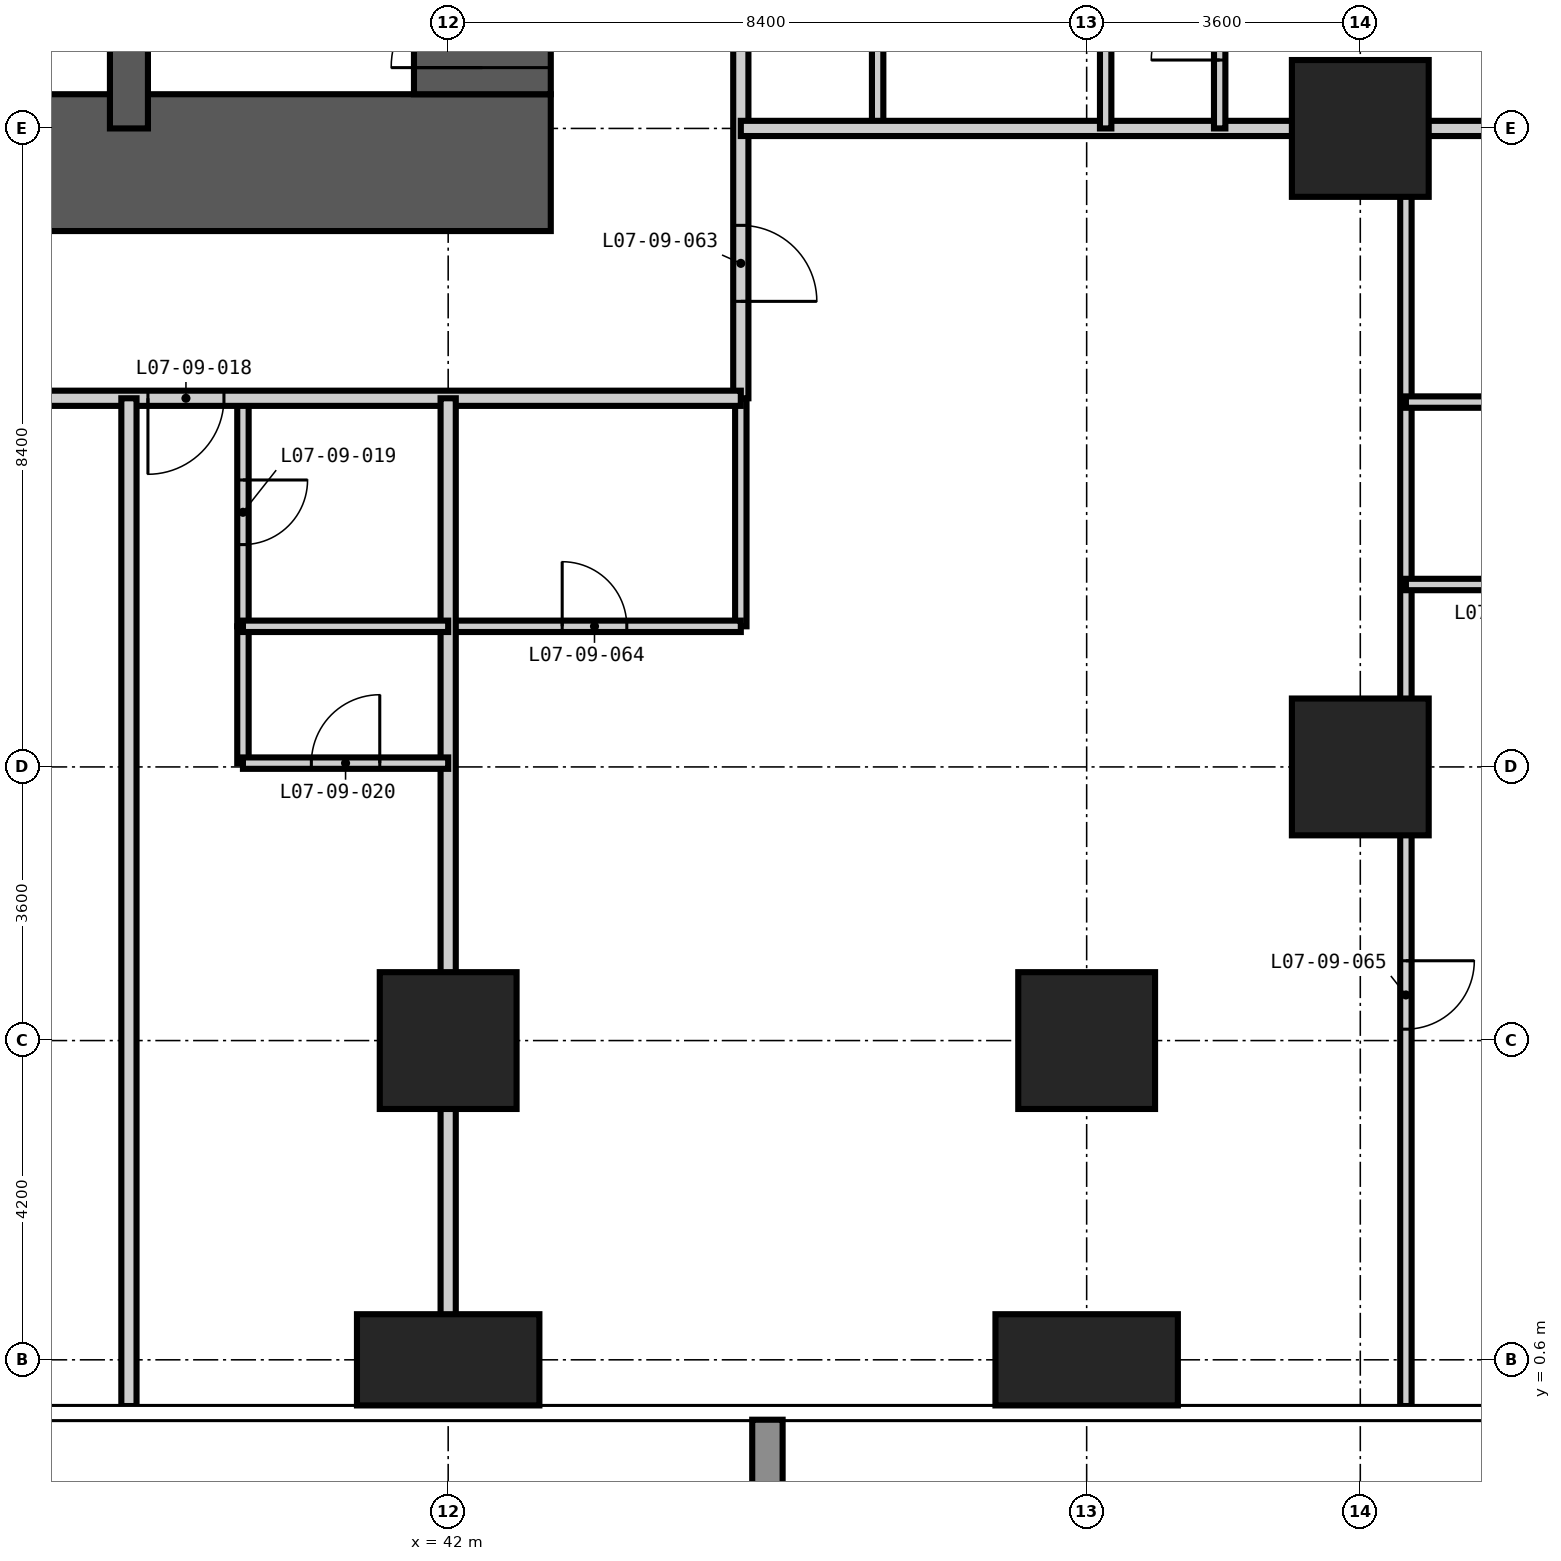
"""IFC4 building model, lengths in metres.
Left out: names, types, materials, properties, quantities, classifications, styles, units other than length and angle.
Written with IfcOpenShell. Run it as: python <this file> out.ifc"""

import sys

from ifc_helpers import new_model, si_unit, direction, frame, frame_2d, origin, origin_2d, place, context, subcontext, project, spatial, rectangle, extrude, element, fill, save


model = new_model("IFC4")
c1 = context("Model", 3, precision=1e-05, world=origin(), true_north=direction((0.0, 1.0)))
c2 = subcontext(c1, "Body", "Model", "MODEL_VIEW")
j1 = project(units=[si_unit("LENGTHUNIT", "METRE"), si_unit("PLANEANGLEUNIT", "RADIAN")], contexts=[c1])
p1 = place(None, origin())
s1 = spatial("IfcSite", under=j1, at=p1, CompositionType="ELEMENT")
p2 = place(p1, origin())
s2 = spatial("IfcBuilding", under=s1, at=p2, CompositionType="ELEMENT")
p3 = place(p2, frame((0.0, 0.0, 34.2)))
s3 = spatial("IfcBuildingStorey", under=s2, at=p3, CompositionType="ELEMENT", Elevation=34.2)
p4 = place(p3, frame((42.0, 0.6, -0.35), z_axis=(0.0, 0.0, 1.0), x_axis=(1.0, 0.0, 0.0)))
e1 = element("IfcColumn", 1, at=p4, inside=s3, PredefinedType="COLUMN", context=c2, shape_type="SweptSolid", body=[
    extrude(rectangle(XDim=2.4, YDim=1.2, at=origin_2d()), origin(), (0.0, 0.0, 1.0), 3.6),
])
p5 = place(p3, frame((42.0, 4.8, -0.35), z_axis=(0.0, 0.0, 1.0), x_axis=(1.0, 0.0, 0.0)))
e2 = element("IfcColumn", 2, at=p5, inside=s3, PredefinedType="COLUMN", context=c2, shape_type="SweptSolid", body=[
    extrude(rectangle(XDim=1.8, YDim=1.8, at=origin_2d()), origin(), (0.0, 0.0, 1.0), 3.6),
])
p6 = place(p3, frame((50.4, 0.6, -0.35), z_axis=(0.0, 0.0, 1.0), x_axis=(1.0, 0.0, 0.0)))
e3 = element("IfcColumn", 3, at=p6, inside=s3, PredefinedType="COLUMN", context=c2, shape_type="SweptSolid", body=[
    extrude(rectangle(XDim=2.4, YDim=1.2, at=origin_2d()), origin(), (0.0, 0.0, 1.0), 3.6),
])
for number, where, z_axis, x_axis in (
    (4, (50.4, 4.8, -0.35), (0.0, 0.0, 1.0), (1.0, 0.0, 0.0)),
    (5, (54.0, 8.4, -0.35), (0.0, 0.0, 1.0), (1.0, 0.0, 0.0)),
    (6, (54.0, 16.8, -0.35), (0.0, 0.0, 1.0), (1.0, 0.0, 0.0)),
):
    element("IfcColumn", number, at=place(p3, frame(where, z_axis=z_axis, x_axis=x_axis)), inside=s3, PredefinedType="COLUMN", context=c2, shape_type="SweptSolid", body=[
        extrude(rectangle(XDim=1.8, YDim=1.8, at=origin_2d()), origin(), (0.0, 0.0, 1.0), 3.6),
    ])
p7 = place(p3, frame((15.45, 16.35, -0.35), z_axis=(0.0, 0.0, 1.0), x_axis=(1.0, 0.0, 0.0)))
e7 = element("IfcWall", 7, at=p7, inside=s3, PredefinedType="SHEAR", context=c2, shape_type="SweptSolid", body=[
    extrude(rectangle(XDim=27.9, YDim=1.8, at=frame_2d((13.95, 0.0))), origin(), (0.0, 0.0, 1.0), 3.6),
])
p8 = place(p7, frame((13.45, 0.0, 0.35)))
e8 = element("IfcOpeningElement", 8, at=p8, cuts=e7, PredefinedType="OPENING", context=c2, shape_type="SweptSolid", body=[
    extrude(rectangle(XDim=1.0, YDim=2.1, at=frame_2d((0.5, 1.05))), frame((0.0, 0.91, 0.0), z_axis=(0.0, -1.0, 0.0), x_axis=(1.0, 0.0, 0.0)), (0.0, 0.0, 1.0), 1.82),
])
p9 = place(p7, frame((19.75, 0.0, 0.35)))
e9 = element("IfcOpeningElement", 9, at=p9, cuts=e7, PredefinedType="OPENING", context=c2, shape_type="SweptSolid", body=[
    extrude(rectangle(XDim=1.0, YDim=2.1, at=frame_2d((0.5, 1.05))), frame((0.0, 0.91, 0.0), z_axis=(0.0, -1.0, 0.0), x_axis=(1.0, 0.0, 0.0)), (0.0, 0.0, 1.0), 1.82),
])
p10 = place(p3, frame((42.45, 17.25, -0.35), z_axis=(0.0, 0.0, 1.0), x_axis=(0.0, 1.0, 0.0)))
e10 = element("IfcWall", 10, at=p10, inside=s3, PredefinedType="SHEAR", context=c2, shape_type="SweptSolid", body=[
    extrude(rectangle(XDim=24.3, YDim=1.8, at=frame_2d((12.15, 0.0))), origin(), (0.0, 0.0, 1.0), 3.6),
])
p11 = place(p10, frame((0.35, 0.0, 0.35)))
e11 = element("IfcOpeningElement", 11, at=p11, cuts=e10, PredefinedType="OPENING", context=c2, shape_type="SweptSolid", body=[
    extrude(rectangle(XDim=1.2, YDim=2.2, at=frame_2d((0.6, 1.1))), frame((0.0, 0.91, 0.0), z_axis=(0.0, -1.0, 0.0), x_axis=(1.0, 0.0, 0.0)), (0.0, 0.0, 1.0), 1.82),
])
p12 = place(p10, frame((11.65, 0.0, 0.35)))
e12 = element("IfcOpeningElement", 12, at=p12, cuts=e10, PredefinedType="OPENING", context=c2, shape_type="SweptSolid", body=[
    extrude(rectangle(XDim=1.0, YDim=2.1, at=frame_2d((0.5, 1.05))), frame((0.0, 0.91, 0.0), z_axis=(0.0, -1.0, 0.0), x_axis=(1.0, 0.0, 0.0)), (0.0, 0.0, 1.0), 1.82),
])
p13 = place(p10, frame((20.05, 0.0, 0.35)))
e13 = element("IfcOpeningElement", 13, at=p13, cuts=e10, PredefinedType="OPENING", context=c2, shape_type="SweptSolid", body=[
    extrude(rectangle(XDim=1.0, YDim=2.1, at=frame_2d((0.5, 1.05))), frame((0.0, 0.91, 0.0), z_axis=(0.0, -1.0, 0.0), x_axis=(1.0, 0.0, 0.0)), (0.0, 0.0, 1.0), 1.82),
])
p14 = place(p3, frame((37.8, 16.8, -0.35), z_axis=(0.0, 0.0, 1.0), x_axis=(0.0, 1.0, 0.0)))
e14 = element("IfcWall", 14, at=p14, inside=s3, PredefinedType="SHEAR", context=c2, shape_type="SweptSolid", body=[
    extrude(rectangle(XDim=11.2, YDim=0.5, at=frame_2d((5.6, 0.0))), origin(), (0.0, 0.0, 1.0), 3.6),
])
p15 = place(p3, frame((39.3, 10.25, 0.0), z_axis=(0.0, 0.0, 1.0), x_axis=(0.0, 1.0, 0.0)))
e15 = element("IfcWall", 15, at=p15, inside=s3, PredefinedType="PARTITIONING", context=c2, shape_type="SweptSolid", body=[
    extrude(rectangle(XDim=3.0, YDim=0.15, at=frame_2d((1.5, 0.0))), origin(), (0.0, 0.0, 1.0), 3.25),
])
p16 = place(p15, frame((1.075, 0.0, 0.0)))
e16 = element("IfcOpeningElement", 16, at=p16, cuts=e15, PredefinedType="OPENING", context=c2, shape_type="SweptSolid", body=[
    extrude(rectangle(XDim=0.85, YDim=2.1, at=frame_2d((0.425, 1.05))), frame((0.0, 0.085, 0.0), z_axis=(0.0, -1.0, 0.0), x_axis=(1.0, 0.0, 0.0)), (0.0, 0.0, 1.0), 0.17),
])
p17 = place(p3, frame((45.85, 10.25, 0.0), z_axis=(0.0, 0.0, 1.0), x_axis=(0.0, 1.0, 0.0)))
e17 = element("IfcWall", 17, at=p17, inside=s3, PredefinedType="PARTITIONING", context=c2, shape_type="SweptSolid", body=[
    extrude(rectangle(XDim=3.0, YDim=0.15, at=frame_2d((1.5, 0.0))), origin(), (0.0, 0.0, 1.0), 3.25),
])
p18 = place(p3, frame((47.65, 16.8, 0.0), z_axis=(0.0, 0.0, 1.0), x_axis=(0.0, 1.0, 0.0)))
e18 = element("IfcWall", 18, at=p18, inside=s3, PredefinedType="PARTITIONING", context=c2, shape_type="SweptSolid", body=[
    extrude(rectangle(XDim=2.7, YDim=0.15, at=frame_2d((1.35, 0.0))), origin(), (0.0, 0.0, 1.0), 3.25),
])
p19 = place(p3, frame((42.0, 10.25, 0.0), z_axis=(0.0, 0.0, 1.0), x_axis=(1.0, 0.0, 0.0)))
e19 = element("IfcWall", 19, at=p19, inside=s3, PredefinedType="PARTITIONING", context=c2, shape_type="SweptSolid", body=[
    extrude(rectangle(XDim=3.85, YDim=0.15, at=frame_2d((1.925, 0.0))), origin(), (0.0, 0.0, 1.0), 3.25),
])
p20 = place(p19, frame((1.5, 0.0, 0.0)))
e20 = element("IfcOpeningElement", 20, at=p20, cuts=e19, PredefinedType="OPENING", context=c2, shape_type="SweptSolid", body=[
    extrude(rectangle(XDim=0.85, YDim=2.1, at=frame_2d((0.425, 1.05))), frame((0.0, 0.085, 0.0), z_axis=(0.0, -1.0, 0.0), x_axis=(1.0, 0.0, 0.0)), (0.0, 0.0, 1.0), 0.17),
])
p21 = place(p3, frame((45.85, 45.25, 0.0), z_axis=(0.0, 0.0, 1.0), x_axis=(0.0, -1.0, 0.0)))
e21 = element("IfcWall", 21, at=p21, inside=s3, PredefinedType="PARTITIONING", context=c2, shape_type="SweptSolid", body=[
    extrude(rectangle(XDim=32.0, YDim=0.2, at=frame_2d((16.0, 0.0))), origin(), (0.0, 0.0, 1.0), 3.25),
])
p22 = place(p21, frame((23.75, 0.0, 0.0)))
e22 = element("IfcOpeningElement", 22, at=p22, cuts=e21, PredefinedType="OPENING", context=c2, shape_type="SweptSolid", body=[
    extrude(rectangle(XDim=1.0, YDim=2.2, at=frame_2d((0.5, 1.1))), frame((0.0, 0.11, 0.0), z_axis=(0.0, -1.0, 0.0), x_axis=(1.0, 0.0, 0.0)), (0.0, 0.0, 1.0), 0.22),
])
p23 = place(p21, frame((15.35, 0.0, 0.0)))
e23 = element("IfcOpeningElement", 23, at=p23, cuts=e21, PredefinedType="OPENING", context=c2, shape_type="SweptSolid", body=[
    extrude(rectangle(XDim=1.0, YDim=2.2, at=frame_2d((0.5, 1.1))), frame((0.0, 0.11, 0.0), z_axis=(0.0, -1.0, 0.0), x_axis=(1.0, 0.0, 0.0)), (0.0, 0.0, 1.0), 0.22),
])
p24 = place(p21, frame((6.95, 0.0, 0.0)))
e24 = element("IfcOpeningElement", 24, at=p24, cuts=e21, PredefinedType="OPENING", context=c2, shape_type="SweptSolid", body=[
    extrude(rectangle(XDim=1.0, YDim=2.2, at=frame_2d((0.5, 1.1))), frame((0.0, 0.11, 0.0), z_axis=(0.0, -1.0, 0.0), x_axis=(1.0, 0.0, 0.0)), (0.0, 0.0, 1.0), 0.22),
])
p25 = place(p21, frame((29.725, 0.0, 0.0)))
e25 = element("IfcOpeningElement", 25, at=p25, cuts=e21, PredefinedType="OPENING", context=c2, shape_type="SweptSolid", body=[
    extrude(rectangle(XDim=1.0, YDim=2.2, at=frame_2d((0.5, 1.1))), frame((0.0, 0.11, 0.0), z_axis=(0.0, -1.0, 0.0), x_axis=(1.0, 0.0, 0.0)), (0.0, 0.0, 1.0), 0.22),
])
p26 = place(p21, frame((1.125, 0.0, 0.0)))
e26 = element("IfcOpeningElement", 26, at=p26, cuts=e21, PredefinedType="OPENING", context=c2, shape_type="SweptSolid", body=[
    extrude(rectangle(XDim=1.0, YDim=2.2, at=frame_2d((0.5, 1.1))), frame((0.0, 0.11, 0.0), z_axis=(0.0, -1.0, 0.0), x_axis=(1.0, 0.0, 0.0)), (0.0, 0.0, 1.0), 0.22),
])
p27 = place(p3, frame((45.85, 13.25, 0.0), z_axis=(0.0, 0.0, 1.0), x_axis=(-1.0, 0.0, 0.0)))
e27 = element("IfcWall", 27, at=p27, inside=s3, PredefinedType="PARTITIONING", context=c2, shape_type="SweptSolid", body=[
    extrude(rectangle(XDim=32.6, YDim=0.2, at=frame_2d((16.3, 0.0))), origin(), (0.0, 0.0, 1.0), 3.25),
])
p28 = place(p27, frame((25.1, 0.0, 0.0)))
e28 = element("IfcOpeningElement", 28, at=p28, cuts=e27, PredefinedType="OPENING", context=c2, shape_type="SweptSolid", body=[
    extrude(rectangle(XDim=1.0, YDim=2.2, at=frame_2d((0.5, 1.1))), frame((0.0, 0.11, 0.0), z_axis=(0.0, -1.0, 0.0), x_axis=(1.0, 0.0, 0.0)), (0.0, 0.0, 1.0), 0.22),
])
p29 = place(p27, frame((21.65, 0.0, 0.0)))
e29 = element("IfcOpeningElement", 29, at=p29, cuts=e27, PredefinedType="OPENING", context=c2, shape_type="SweptSolid", body=[
    extrude(rectangle(XDim=1.0, YDim=2.2, at=frame_2d((0.5, 1.1))), frame((0.0, 0.11, 0.0), z_axis=(0.0, -1.0, 0.0), x_axis=(1.0, 0.0, 0.0)), (0.0, 0.0, 1.0), 0.22),
])
p30 = place(p27, frame((11.75, 0.0, 0.0)))
e30 = element("IfcOpeningElement", 30, at=p30, cuts=e27, PredefinedType="OPENING", context=c2, shape_type="SweptSolid", body=[
    extrude(rectangle(XDim=1.0, YDim=2.2, at=frame_2d((0.5, 1.1))), frame((0.0, 0.11, 0.0), z_axis=(0.0, -1.0, 0.0), x_axis=(1.0, 0.0, 0.0)), (0.0, 0.0, 1.0), 0.22),
])
p31 = place(p27, frame((6.8, 0.0, 0.0)))
e31 = element("IfcOpeningElement", 31, at=p31, cuts=e27, PredefinedType="OPENING", context=c2, shape_type="SweptSolid", body=[
    extrude(rectangle(XDim=1.0, YDim=2.2, at=frame_2d((0.5, 1.1))), frame((0.0, 0.11, 0.0), z_axis=(0.0, -1.0, 0.0), x_axis=(1.0, 0.0, 0.0)), (0.0, 0.0, 1.0), 0.22),
])
for number, where, z_axis, x_axis in (
    (32, (37.8, -0.008, 0.0), (0.0, 0.0, 1.0), (0.0, 1.0, 0.0)),
    (33, (42.0, -0.008, 0.0), (0.0, 0.0, 1.0), (0.0, 1.0, 0.0)),
):
    element("IfcWall", number, at=place(p3, frame(where, z_axis=z_axis, x_axis=x_axis)), inside=s3, PredefinedType="PARTITIONING", context=c2, shape_type="SweptSolid", body=[
        extrude(rectangle(XDim=13.258, YDim=0.2, at=frame_2d((6.629, 0.0))), origin(), (0.0, 0.0, 1.0), 3.25),
    ])
p32 = place(p3, frame((45.85, 16.8, 0.0), z_axis=(0.0, 0.0, 1.0), x_axis=(1.0, 0.0, 0.0)))
e34 = element("IfcWall", 34, at=p32, inside=s3, PredefinedType="PARTITIONING", context=c2, shape_type="SweptSolid", body=[
    extrude(rectangle(XDim=12.958, YDim=0.2, at=frame_2d((6.479, 0.0))), origin(), (0.0, 0.0, 1.0), 3.25),
])
p33 = place(p3, frame((39.3, 8.45, 0.0), z_axis=(0.0, 0.0, 1.0), x_axis=(0.0, 1.0, 0.0)))
e35 = element("IfcWall", 35, at=p33, inside=s3, PredefinedType="PARTITIONING", context=c2, shape_type="SweptSolid", body=[
    extrude(rectangle(XDim=1.8, YDim=0.15, at=frame_2d((0.9, 0.0))), origin(), (0.0, 0.0, 1.0), 3.25),
])
p34 = place(p3, frame((50.65, 16.8, 0.0), z_axis=(0.0, 0.0, 1.0), x_axis=(0.0, 1.0, 0.0)))
e36 = element("IfcWall", 36, at=p34, inside=s3, PredefinedType="PARTITIONING", context=c2, shape_type="SweptSolid", body=[
    extrude(rectangle(XDim=2.7, YDim=0.15, at=frame_2d((1.35, 0.0))), origin(), (0.0, 0.0, 1.0), 3.25),
])
p35 = place(p3, frame((52.15, 16.8, 0.0), z_axis=(0.0, 0.0, 1.0), x_axis=(0.0, 1.0, 0.0)))
e37 = element("IfcWall", 37, at=p35, inside=s3, PredefinedType="PARTITIONING", context=c2, shape_type="SweptSolid", body=[
    extrude(rectangle(XDim=2.7, YDim=0.15, at=frame_2d((1.35, 0.0))), origin(), (0.0, 0.0, 1.0), 3.25),
])
p36 = place(p35, frame((0.9, 0.0, 0.0)))
e38 = element("IfcOpeningElement", 38, at=p36, cuts=e37, PredefinedType="OPENING", context=c2, shape_type="SweptSolid", body=[
    extrude(rectangle(XDim=0.9, YDim=2.1, at=frame_2d((0.45, 1.05))), frame((0.0, 0.085, 0.0), z_axis=(0.0, -1.0, 0.0), x_axis=(1.0, 0.0, 0.0)), (0.0, 0.0, 1.0), 0.17),
])
p37 = place(p3, frame((54.6, -0.008, 0.0), z_axis=(0.0, 0.0, 1.0), x_axis=(0.0, 1.0, 0.0)))
e39 = element("IfcWall", 39, at=p37, inside=s3, PredefinedType="PARTITIONING", context=c2, shape_type="SweptSolid", body=[
    extrude(rectangle(XDim=16.808, YDim=0.15, at=frame_2d((8.404, 0.0))), origin(), (0.0, 0.0, 1.0), 3.25),
])
p38 = place(p37, frame((4.958, 0.0, 0.0)))
e40 = element("IfcOpeningElement", 40, at=p38, cuts=e39, PredefinedType="OPENING", context=c2, shape_type="SweptSolid", body=[
    extrude(rectangle(XDim=0.9, YDim=2.1, at=frame_2d((0.45, 1.05))), frame((0.0, 0.085, 0.0), z_axis=(0.0, -1.0, 0.0), x_axis=(1.0, 0.0, 0.0)), (0.0, 0.0, 1.0), 0.17),
])
p39 = place(p3, frame((39.3, 8.45, 0.0), z_axis=(0.0, 0.0, 1.0), x_axis=(1.0, 0.0, 0.0)))
e41 = element("IfcWall", 41, at=p39, inside=s3, PredefinedType="PARTITIONING", context=c2, shape_type="SweptSolid", body=[
    extrude(rectangle(XDim=2.7, YDim=0.15, at=frame_2d((1.35, 0.0))), origin(), (0.0, 0.0, 1.0), 3.25),
])
p40 = place(p39, frame((0.9, 0.0, 0.0)))
e42 = element("IfcOpeningElement", 42, at=p40, cuts=e41, PredefinedType="OPENING", context=c2, shape_type="SweptSolid", body=[
    extrude(rectangle(XDim=0.9, YDim=2.1, at=frame_2d((0.45, 1.05))), frame((0.0, 0.085, 0.0), z_axis=(0.0, -1.0, 0.0), x_axis=(1.0, 0.0, 0.0)), (0.0, 0.0, 1.0), 0.17),
])
p41 = place(p3, frame((39.3, 10.25, 0.0), z_axis=(0.0, 0.0, 1.0), x_axis=(1.0, 0.0, 0.0)))
e43 = element("IfcWall", 43, at=p41, inside=s3, PredefinedType="PARTITIONING", context=c2, shape_type="SweptSolid", body=[
    extrude(rectangle(XDim=2.7, YDim=0.15, at=frame_2d((1.35, 0.0))), origin(), (0.0, 0.0, 1.0), 3.25),
])
p42 = place(p3, frame((54.6, 10.8, 0.0), z_axis=(0.0, 0.0, 1.0), x_axis=(1.0, 0.0, 0.0)))
e44 = element("IfcWall", 44, at=p42, inside=s3, PredefinedType="PARTITIONING", context=c2, shape_type="SweptSolid", body=[
    extrude(rectangle(XDim=3.0, YDim=0.15, at=frame_2d((1.5, 0.0))), origin(), (0.0, 0.0, 1.0), 3.25),
])
p43 = place(p42, frame((1.05, 0.0, 0.0)))
e45 = element("IfcOpeningElement", 45, at=p43, cuts=e44, PredefinedType="OPENING", context=c2, shape_type="SweptSolid", body=[
    extrude(rectangle(XDim=0.9, YDim=2.1, at=frame_2d((0.45, 1.05))), frame((0.0, 0.085, 0.0), z_axis=(0.0, -1.0, 0.0), x_axis=(1.0, 0.0, 0.0)), (0.0, 0.0, 1.0), 0.17),
])
p44 = place(p3, frame((54.6, 13.2, 0.0), z_axis=(0.0, 0.0, 1.0), x_axis=(1.0, 0.0, 0.0)))
e46 = element("IfcWall", 46, at=p44, inside=s3, PredefinedType="PARTITIONING", context=c2, shape_type="SweptSolid", body=[
    extrude(rectangle(XDim=3.0, YDim=0.15, at=frame_2d((1.5, 0.0))), origin(), (0.0, 0.0, 1.0), 3.25),
])
p45 = place(p11, origin())
e47 = element("IfcDoor", 47, at=p45, inside=s3, OperationType="SINGLE_SWING_LEFT", PredefinedType="DOOR", context=c2, shape_type="SweptSolid", body=[
    extrude(rectangle(XDim=1.2, YDim=2.2, at=frame_2d((0.6, 1.1))), frame((0.0, 0.025, 0.0), z_axis=(0.0, -1.0, 0.0), x_axis=(1.0, 0.0, 0.0)), (0.0, 0.0, 1.0), 0.05),
])
fill(e11, e47)
p46 = place(p31, origin())
e48 = element("IfcDoor", 48, at=p46, inside=s3, OperationType="SINGLE_SWING_RIGHT", PredefinedType="DOOR", context=c2, shape_type="SweptSolid", body=[
    extrude(rectangle(XDim=1.0, YDim=2.2, at=frame_2d((0.5, 1.1))), frame((0.0, 0.025, 0.0), z_axis=(0.0, -1.0, 0.0), x_axis=(1.0, 0.0, 0.0)), (0.0, 0.0, 1.0), 0.05),
])
fill(e31, e48)
p47 = place(p16, frame((0.85, 0.0, 0.0), z_axis=(0.0, 0.0, 1.0), x_axis=(-1.0, 0.0, 0.0)))
e49 = element("IfcDoor", 49, at=p47, inside=s3, OperationType="SINGLE_SWING_LEFT", PredefinedType="DOOR", context=c2, shape_type="SweptSolid", body=[
    extrude(rectangle(XDim=0.85, YDim=2.1, at=frame_2d((0.425, 1.05))), frame((0.0, 0.025, 0.0), z_axis=(0.0, -1.0, 0.0), x_axis=(1.0, 0.0, 0.0)), (0.0, 0.0, 1.0), 0.05),
])
fill(e16, e49)
p48 = place(p40, origin())
e50 = element("IfcDoor", 50, at=p48, inside=s3, OperationType="SINGLE_SWING_RIGHT", PredefinedType="DOOR", context=c2, shape_type="SweptSolid", body=[
    extrude(rectangle(XDim=0.9, YDim=2.1, at=frame_2d((0.45, 1.05))), frame((0.0, 0.025, 0.0), z_axis=(0.0, -1.0, 0.0), x_axis=(1.0, 0.0, 0.0)), (0.0, 0.0, 1.0), 0.05),
])
fill(e42, e50)
p49 = place(p36, origin())
e51 = element("IfcDoor", 51, at=p49, inside=s3, OperationType="SINGLE_SWING_LEFT", PredefinedType="DOOR", context=c2, shape_type="SweptSolid", body=[
    extrude(rectangle(XDim=0.9, YDim=2.1, at=frame_2d((0.45, 1.05))), frame((0.0, 0.025, 0.0), z_axis=(0.0, -1.0, 0.0), x_axis=(1.0, 0.0, 0.0)), (0.0, 0.0, 1.0), 0.05),
])
fill(e38, e51)
p50 = place(p25, origin())
e52 = element("IfcDoor", 52, at=p50, inside=s3, OperationType="SINGLE_SWING_RIGHT", PredefinedType="DOOR", context=c2, shape_type="SweptSolid", body=[
    extrude(rectangle(XDim=1.0, YDim=2.2, at=frame_2d((0.5, 1.1))), frame((0.0, 0.025, 0.0), z_axis=(0.0, -1.0, 0.0), x_axis=(1.0, 0.0, 0.0)), (0.0, 0.0, 1.0), 0.05),
])
fill(e25, e52)
p51 = place(p20, origin())
e53 = element("IfcDoor", 53, at=p51, inside=s3, OperationType="SINGLE_SWING_LEFT", PredefinedType="DOOR", context=c2, shape_type="SweptSolid", body=[
    extrude(rectangle(XDim=0.85, YDim=2.1, at=frame_2d((0.425, 1.05))), frame((0.0, 0.025, 0.0), z_axis=(0.0, -1.0, 0.0), x_axis=(1.0, 0.0, 0.0)), (0.0, 0.0, 1.0), 0.05),
])
fill(e20, e53)
p52 = place(p38, frame((0.9, 0.0, 0.0), z_axis=(0.0, 0.0, 1.0), x_axis=(-1.0, 0.0, 0.0)))
e54 = element("IfcDoor", 54, at=p52, inside=s3, OperationType="SINGLE_SWING_LEFT", PredefinedType="DOOR", context=c2, shape_type="SweptSolid", body=[
    extrude(rectangle(XDim=0.9, YDim=2.1, at=frame_2d((0.45, 1.05))), frame((0.0, 0.025, 0.0), z_axis=(0.0, -1.0, 0.0), x_axis=(1.0, 0.0, 0.0)), (0.0, 0.0, 1.0), 0.05),
])
fill(e40, e54)
save(model, sys.argv[1])
